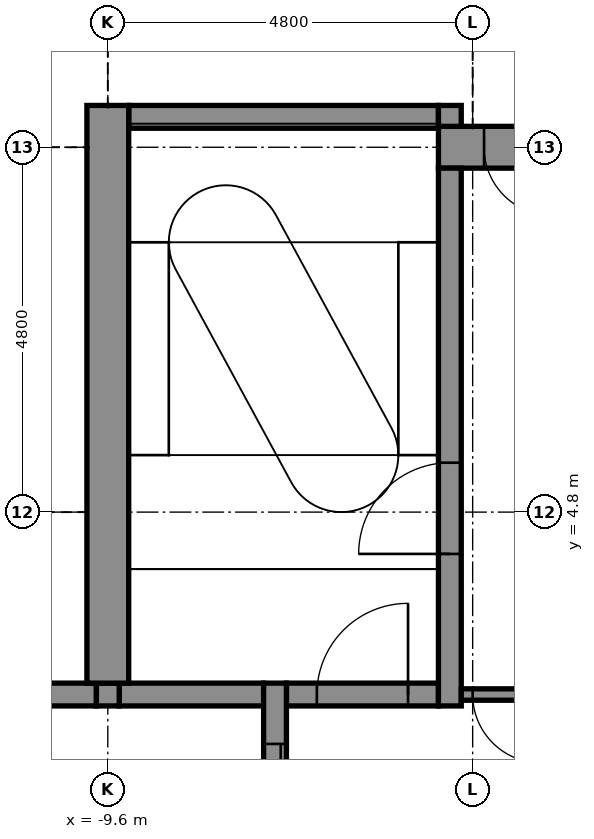
"""IFC4 building model, lengths in metres.
Left out: names, types, materials, properties, quantities, classifications, styles, units other than length and angle.
Written with IfcOpenShell. Run it as: python <this file> out.ifc"""

import sys

from ifc_helpers import new_model, si_unit, direction, frame, frame_2d, origin, place, context, subcontext, project, spatial, rectangle, extrude, element, fill, save


model = new_model("IFC4")
c1 = context("Model", 3, precision=1e-05, world=origin(), true_north=direction((0.0, 1.0)))
c2 = subcontext(c1, "Body", "Model", "MODEL_VIEW")
j1 = project(units=[si_unit("LENGTHUNIT", "METRE"), si_unit("PLANEANGLEUNIT", "RADIAN")], contexts=[c1])
p1 = place(None, origin())
s1 = spatial("IfcSite", under=j1, at=p1, CompositionType="ELEMENT")
p2 = place(p1, origin())
s2 = spatial("IfcBuilding", under=s1, at=p2, CompositionType="ELEMENT")
p3 = place(p2, frame((0.0, 0.0, 273.5)))
s3 = spatial("IfcBuildingStorey", under=s2, at=p3, CompositionType="ELEMENT", Elevation=273.5)
p4 = place(p3, frame((-10.85, 2.4, -0.15), z_axis=(0.0, 0.0, 1.0), x_axis=(1.0, 0.0, 0.0)))
e1 = element("IfcWall", 1, at=p4, inside=s3, PredefinedType="STANDARD", context=c2, shape_type="SweptSolid", body=[
    extrude(rectangle(XDim=1.1, YDim=0.3, at=frame_2d((0.55, 0.0))), origin(), (0.0, 0.0, 1.0), 3.9),
])
p5 = place(p3, frame((-9.45, 2.4, -0.15), z_axis=(0.0, 0.0, 1.0), x_axis=(1.0, 0.0, 0.0)))
e2 = element("IfcWall", 2, at=p5, inside=s3, PredefinedType="STANDARD", context=c2, shape_type="SweptSolid", body=[
    extrude(rectangle(XDim=1.9, YDim=0.3, at=frame_2d((0.95, 0.0))), origin(), (0.0, 0.0, 1.0), 3.9),
])
p6 = place(p3, frame((-7.25, 2.4, -0.15), z_axis=(0.0, 0.0, 1.0), x_axis=(1.0, 0.0, 0.0)))
e3 = element("IfcWall", 3, at=p6, inside=s3, PredefinedType="STANDARD", context=c2, shape_type="SweptSolid", body=[
    extrude(rectangle(XDim=2.0, YDim=0.3, at=frame_2d((1.0, 0.0))), origin(), (0.0, 0.0, 1.0), 3.9),
])
p7 = place(p6, frame((0.4, 0.0, 0.15)))
e4 = element("IfcOpeningElement", 4, at=p7, cuts=e3, PredefinedType="OPENING", context=c2, shape_type="SweptSolid", body=[
    extrude(rectangle(XDim=1.2, YDim=2.1, at=frame_2d((0.6, 1.05))), frame((0.0, 0.16, 0.0), z_axis=(0.0, -1.0, 0.0), x_axis=(1.0, 0.0, 0.0)), (0.0, 0.0, 1.0), 0.32),
])
p8 = place(p3, frame((-5.25, 9.6, -0.15), z_axis=(0.0, 0.0, 1.0), x_axis=(1.0, 0.0, 0.0)))
e5 = element("IfcWall", 5, at=p8, inside=s3, PredefinedType="SHEAR", context=c2, shape_type="SweptSolid", body=[
    extrude(rectangle(XDim=14.575, YDim=0.55, at=frame_2d((7.288, 0.0))), origin(), (0.0, 0.0, 1.0), 3.9),
])
p9 = place(p8, frame((0.6, 0.0, 0.15)))
e6 = element("IfcOpeningElement", 6, at=p9, cuts=e5, PredefinedType="OPENING", context=c2, shape_type="SweptSolid", body=[
    extrude(rectangle(XDim=0.9, YDim=2.1, at=frame_2d((0.45, 1.05))), frame((0.0, 0.285, 0.0), z_axis=(0.0, -1.0, 0.0), x_axis=(1.0, 0.0, 0.0)), (0.0, 0.0, 1.0), 0.57),
])
p10 = place(p3, frame((-9.325, 10.0, -0.15), z_axis=(0.0, 0.0, 1.0), x_axis=(1.0, 0.0, 0.0)))
e7 = element("IfcWall", 7, at=p10, inside=s3, PredefinedType="STANDARD", context=c2, shape_type="SweptSolid", body=[
    extrude(rectangle(XDim=4.075, YDim=0.3, at=frame_2d((2.038, 0.0))), origin(), (0.0, 0.0, 1.0), 3.9),
])
p11 = place(p3, frame((-9.6, 2.25, -0.15), z_axis=(0.0, 0.0, 1.0), x_axis=(0.0, 1.0, 0.0)))
e8 = element("IfcWall", 8, at=p11, inside=s3, PredefinedType="STANDARD", context=c2, shape_type="SweptSolid", body=[
    extrude(rectangle(XDim=0.3, YDim=0.3, at=frame_2d((0.15, 0.0))), origin(), (0.0, 0.0, 1.0), 3.9),
])
p12 = place(p3, frame((-9.6, 2.55, -0.15), z_axis=(0.0, 0.0, 1.0), x_axis=(0.0, 1.0, 0.0)))
e9 = element("IfcWall", 9, at=p12, inside=s3, PredefinedType="SHEAR", context=c2, shape_type="SweptSolid", body=[
    extrude(rectangle(XDim=7.6, YDim=0.55, at=frame_2d((3.8, 0.0))), origin(), (0.0, 0.0, 1.0), 3.9),
])
p13 = place(p3, frame((-7.4, -2.55, -0.15), z_axis=(0.0, 0.0, 1.0), x_axis=(0.0, 1.0, 0.0)))
e10 = element("IfcWall", 10, at=p13, inside=s3, PredefinedType="STANDARD", context=c2, shape_type="SweptSolid", body=[
    extrude(rectangle(XDim=5.1, YDim=0.3, at=frame_2d((2.55, 0.0))), origin(), (0.0, 0.0, 1.0), 3.9),
])
p14 = place(p13, frame((0.8, 0.0, 0.15)))
e11 = element("IfcOpeningElement", 11, at=p14, cuts=e10, PredefinedType="OPENING", context=c2, shape_type="SweptSolid", body=[
    extrude(rectangle(XDim=1.1, YDim=2.1, at=frame_2d((0.55, 1.05))), frame((0.0, 0.16, 0.0), z_axis=(0.0, -1.0, 0.0), x_axis=(1.0, 0.0, 0.0)), (0.0, 0.0, 1.0), 0.32),
])
p15 = place(p13, frame((3.2, 0.0, 0.15)))
e12 = element("IfcOpeningElement", 12, at=p15, cuts=e10, PredefinedType="OPENING", context=c2, shape_type="SweptSolid", body=[
    extrude(rectangle(XDim=1.1, YDim=2.1, at=frame_2d((0.55, 1.05))), frame((0.0, 0.16, 0.0), z_axis=(0.0, -1.0, 0.0), x_axis=(1.0, 0.0, 0.0)), (0.0, 0.0, 1.0), 0.32),
])
p16 = place(p3, frame((-5.1, 2.25, -0.15), z_axis=(0.0, 0.0, 1.0), x_axis=(0.0, 1.0, 0.0)))
e13 = element("IfcWall", 13, at=p16, inside=s3, PredefinedType="STANDARD", context=c2, shape_type="SweptSolid", body=[
    extrude(rectangle(XDim=7.075, YDim=0.3, at=frame_2d((3.538, 0.0))), origin(), (0.0, 0.0, 1.0), 3.9),
])
p17 = place(p16, frame((2.0, 0.0, 0.15)))
e14 = element("IfcOpeningElement", 14, at=p17, cuts=e13, PredefinedType="OPENING", context=c2, shape_type="SweptSolid", body=[
    extrude(rectangle(XDim=1.2, YDim=2.1, at=frame_2d((0.6, 1.05))), frame((0.0, 0.16, 0.0), z_axis=(0.0, -1.0, 0.0), x_axis=(1.0, 0.0, 0.0)), (0.0, 0.0, 1.0), 0.32),
])
p18 = place(p3, frame((-5.1, 9.875, -0.15), z_axis=(0.0, 0.0, 1.0), x_axis=(0.0, 1.0, 0.0)))
e15 = element("IfcWall", 15, at=p18, inside=s3, PredefinedType="STANDARD", context=c2, shape_type="SweptSolid", body=[
    extrude(rectangle(XDim=0.275, YDim=0.3, at=frame_2d((0.137, 0.0))), origin(), (0.0, 0.0, 1.0), 3.9),
])
p19 = place(p3, frame((-4.95, 2.4, 0.0), z_axis=(0.0, 0.0, 1.0), x_axis=(1.0, 0.0, 0.0)))
e16 = element("IfcWall", 16, at=p19, inside=s3, PredefinedType="PARTITIONING", context=c2, shape_type="SweptSolid", body=[
    extrude(rectangle(XDim=1.2, YDim=0.15, at=frame_2d((0.6, 0.0))), origin(), (0.0, 0.0, 1.0), 3.75),
])
p20 = place(p19, frame((0.15, 0.0, 0.0)))
e17 = element("IfcOpeningElement", 17, at=p20, cuts=e16, PredefinedType="OPENING", context=c2, shape_type="SweptSolid", body=[
    extrude(rectangle(XDim=0.9, YDim=2.1, at=frame_2d((0.45, 1.05))), frame((0.0, 0.085, 0.0), z_axis=(0.0, -1.0, 0.0), x_axis=(1.0, 0.0, 0.0)), (0.0, 0.0, 1.0), 0.17),
])
p21 = place(p15, origin())
e18 = element("IfcDoor", 18, at=p21, inside=s3, OperationType="DOUBLE_DOOR_SLIDING", PredefinedType="DOOR", context=c2, shape_type="SweptSolid", body=[
    extrude(rectangle(XDim=1.1, YDim=2.1, at=frame_2d((0.55, 1.05))), frame((0.0, 0.025, 0.0), z_axis=(0.0, -1.0, 0.0), x_axis=(1.0, 0.0, 0.0)), (0.0, 0.0, 1.0), 0.05),
])
fill(e12, e18)
p22 = place(p17, origin())
e19 = element("IfcDoor", 19, at=p22, inside=s3, OperationType="SINGLE_SWING_LEFT", PredefinedType="DOOR", context=c2, shape_type="SweptSolid", body=[
    extrude(rectangle(XDim=1.2, YDim=2.1, at=frame_2d((0.6, 1.05))), frame((0.0, 0.025, 0.0), z_axis=(0.0, -1.0, 0.0), x_axis=(1.0, 0.0, 0.0)), (0.0, 0.0, 1.0), 0.05),
])
fill(e14, e19)
p23 = place(p9, frame((0.9, 0.0, 0.0), z_axis=(0.0, 0.0, 1.0), x_axis=(-1.0, 0.0, 0.0)))
e20 = element("IfcDoor", 20, at=p23, inside=s3, OperationType="SINGLE_SWING_RIGHT", PredefinedType="DOOR", context=c2, shape_type="SweptSolid", body=[
    extrude(rectangle(XDim=0.9, YDim=2.1, at=frame_2d((0.45, 1.05))), frame((0.0, 0.025, 0.0), z_axis=(0.0, -1.0, 0.0), x_axis=(1.0, 0.0, 0.0)), (0.0, 0.0, 1.0), 0.05),
])
fill(e6, e20)
p24 = place(p20, frame((0.9, 0.0, 0.0), z_axis=(0.0, 0.0, 1.0), x_axis=(-1.0, 0.0, 0.0)))
e21 = element("IfcDoor", 21, at=p24, inside=s3, OperationType="SINGLE_SWING_RIGHT", PredefinedType="DOOR", context=c2, shape_type="SweptSolid", body=[
    extrude(rectangle(XDim=0.9, YDim=2.1, at=frame_2d((0.45, 1.05))), frame((0.0, 0.025, 0.0), z_axis=(0.0, -1.0, 0.0), x_axis=(1.0, 0.0, 0.0)), (0.0, 0.0, 1.0), 0.05),
])
fill(e17, e21)
p25 = place(p7, origin())
e22 = element("IfcDoor", 22, at=p25, inside=s3, OperationType="SINGLE_SWING_RIGHT", PredefinedType="DOOR", context=c2, shape_type="SweptSolid", body=[
    extrude(rectangle(XDim=1.2, YDim=2.1, at=frame_2d((0.6, 1.05))), frame((0.0, 0.025, 0.0), z_axis=(0.0, -1.0, 0.0), x_axis=(1.0, 0.0, 0.0)), (0.0, 0.0, 1.0), 0.05),
])
fill(e4, e22)
save(model, sys.argv[1])
